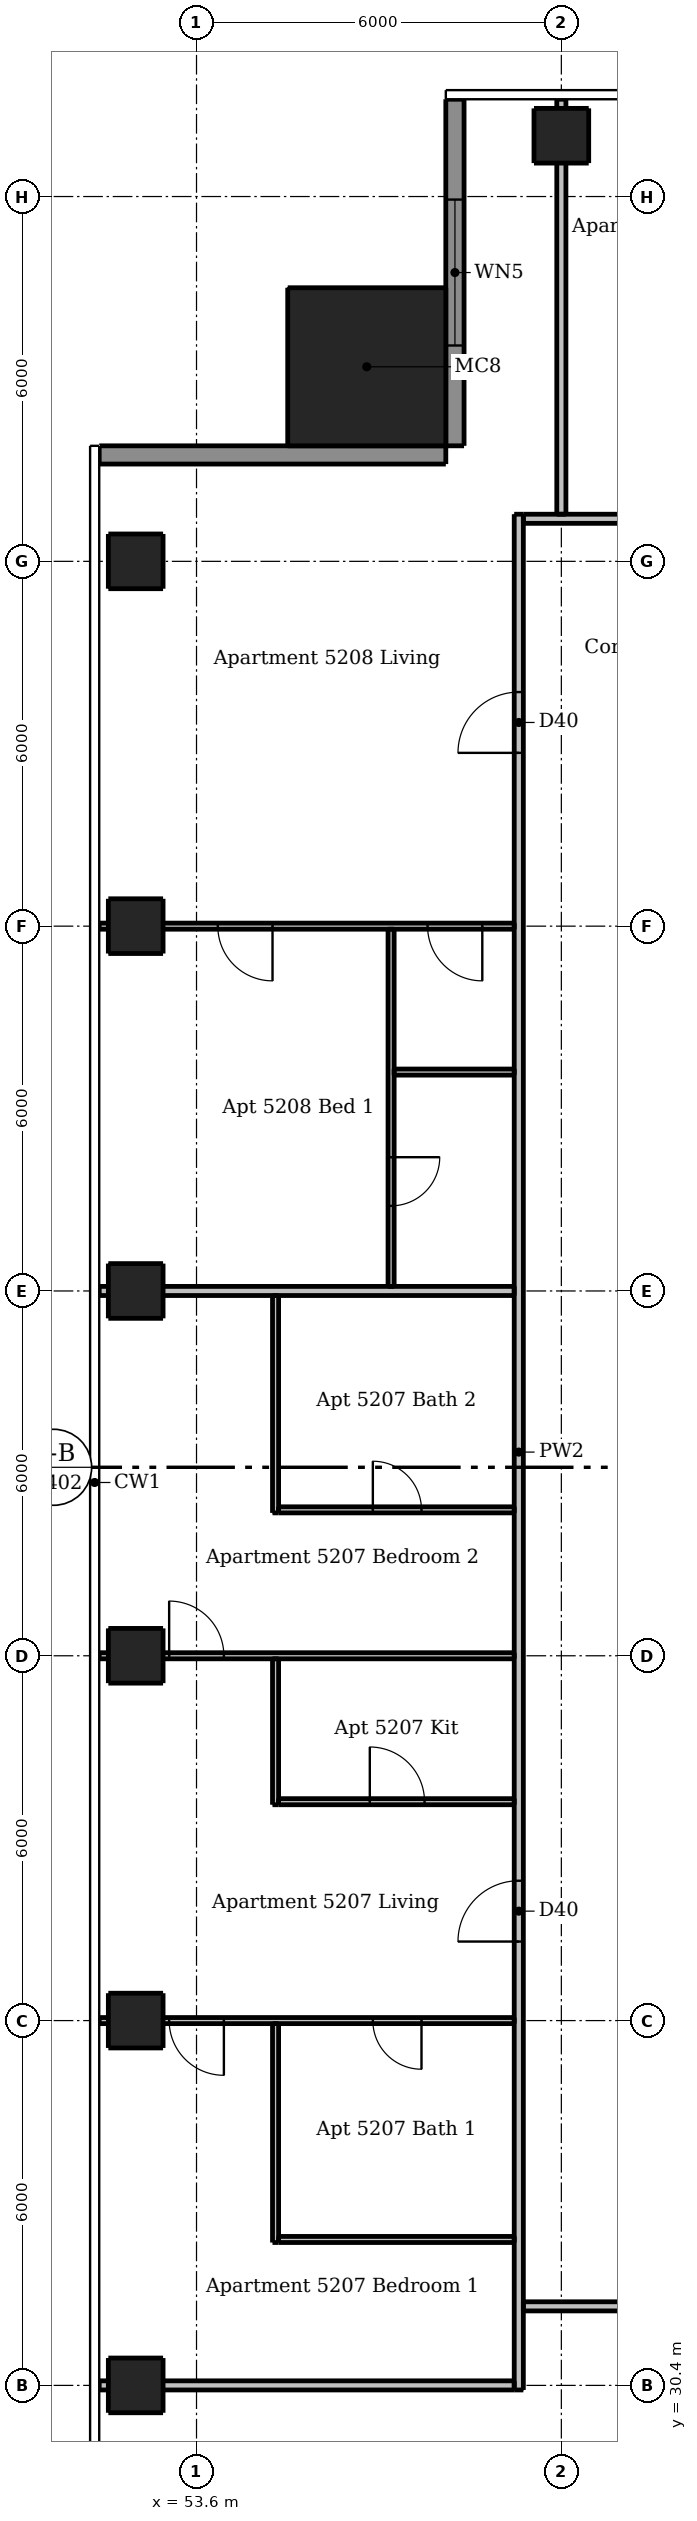
"""IFC4 building model, lengths in metres.
Left out: names, types, materials, properties, quantities, classifications, styles, units other than length and angle.
Written with IfcOpenShell. Run it as: python <this file> out.ifc"""

import sys

from ifc_helpers import new_model, si_unit, direction, frame, frame_2d, origin, origin_2d, place, context, subcontext, project, spatial, rectangle, extrude, element, fill, save


model = new_model("IFC4")
c1 = context("Model", 3, precision=1e-05, world=origin(), true_north=direction((0.0, 1.0)))
c2 = subcontext(c1, "Body", "Model", "MODEL_VIEW")
j1 = project(units=[si_unit("LENGTHUNIT", "METRE"), si_unit("PLANEANGLEUNIT", "RADIAN")], contexts=[c1])
p1 = place(None, origin())
s1 = spatial("IfcSite", under=j1, at=p1, CompositionType="ELEMENT")
p2 = place(p1, origin())
s2 = spatial("IfcBuilding", under=s1, at=p2, CompositionType="ELEMENT")
p3 = place(p2, frame((0.0, 0.0, 196.9)))
s3 = spatial("IfcBuildingStorey", under=s2, at=p3, CompositionType="ELEMENT", Elevation=196.9)
for number, where, z_axis, x_axis in (
    (1, (59.6, 67.4, 0.0), (0.0, 0.0, 1.0), (1.0, 0.0, 0.0)),
    (2, (52.6, 30.4, 0.0), (0.0, 0.0, 1.0), (1.0, 0.0, 0.0)),
    (3, (52.6, 36.4, 0.0), (0.0, 0.0, 1.0), (1.0, 0.0, 0.0)),
    (4, (52.6, 42.4, 0.0), (0.0, 0.0, 1.0), (1.0, 0.0, 0.0)),
    (5, (52.6, 48.4, 0.0), (0.0, 0.0, 1.0), (1.0, 0.0, 0.0)),
    (6, (52.6, 54.4, 0.0), (0.0, 0.0, 1.0), (1.0, 0.0, 0.0)),
    (7, (52.6, 60.4, 0.0), (0.0, 0.0, 1.0), (1.0, 0.0, 0.0)),
):
    element("IfcColumn", number, at=place(p3, frame(where, z_axis=z_axis, x_axis=x_axis)), inside=s3, PredefinedType="COLUMN", context=c2, shape_type="SweptSolid", body=[
        extrude(rectangle(XDim=0.9, YDim=0.9, at=origin_2d()), origin(), (0.0, 0.0, 1.0), 3.05),
    ])
p4 = place(p3, frame((56.4, 63.6, 0.0), z_axis=(0.0, 0.0, 1.0), x_axis=(1.0, 0.0, 0.0)))
e8 = element("IfcColumn", 8, at=p4, inside=s3, PredefinedType="COLUMN", context=c2, shape_type="SweptSolid", body=[
    extrude(rectangle(XDim=2.6, YDim=2.6, at=origin_2d()), origin(), (0.0, 0.0, 1.0), 3.3),
])
p5 = place(p3, frame((57.85, 68.0, 0.0), z_axis=(0.0, 0.0, 1.0), x_axis=(0.0, -1.0, 0.0)))
e9 = element("IfcWall", 9, at=p5, inside=s3, PredefinedType="SOLIDWALL", context=c2, shape_type="SweptSolid", body=[
    extrude(rectangle(XDim=5.7, YDim=0.3, at=frame_2d((2.85, 0.0))), origin(), (0.0, 0.0, 1.0), 3.05),
])
p6 = place(p5, frame((1.65, 0.0, 0.15)))
e10 = element("IfcOpeningElement", 10, at=p6, cuts=e9, PredefinedType="OPENING", context=c2, shape_type="SweptSolid", body=[
    extrude(rectangle(XDim=2.4, YDim=2.1, at=frame_2d((1.2, 1.05))), frame((0.0, 0.16, 0.0), z_axis=(0.0, -1.0, 0.0), x_axis=(1.0, 0.0, 0.0)), (0.0, 0.0, 1.0), 0.32),
])
p7 = place(p3, frame((57.7, 62.15, 0.0), z_axis=(0.0, 0.0, 1.0), x_axis=(-1.0, 0.0, 0.0)))
e11 = element("IfcWall", 11, at=p7, inside=s3, PredefinedType="SOLIDWALL", context=c2, shape_type="SweptSolid", body=[
    extrude(rectangle(XDim=5.7, YDim=0.3, at=frame_2d((2.85, 0.0))), origin(), (0.0, 0.0, 1.0), 3.05),
])
p8 = place(p3, frame((54.9, 32.75, 0.0), z_axis=(0.0, 0.0, 1.0), x_axis=(0.0, 1.0, 0.0)))
e12 = element("IfcWall", 12, at=p8, inside=s3, PredefinedType="PARTITIONING", context=c2, shape_type="SweptSolid", body=[
    extrude(rectangle(XDim=3.6, YDim=0.1, at=frame_2d((1.8, 0.0))), origin(), (0.0, 0.0, 1.0), 3.05),
])
p9 = place(p3, frame((54.9, 39.95, 0.0), z_axis=(0.0, 0.0, 1.0), x_axis=(0.0, 1.0, 0.0)))
e13 = element("IfcWall", 13, at=p9, inside=s3, PredefinedType="PARTITIONING", context=c2, shape_type="SweptSolid", body=[
    extrude(rectangle(XDim=2.4, YDim=0.1, at=frame_2d((1.2, 0.0))), origin(), (0.0, 0.0, 1.0), 3.05),
])
p10 = place(p3, frame((54.9, 44.75, 0.0), z_axis=(0.0, 0.0, 1.0), x_axis=(0.0, 1.0, 0.0)))
e14 = element("IfcWall", 14, at=p10, inside=s3, PredefinedType="PARTITIONING", context=c2, shape_type="SweptSolid", body=[
    extrude(rectangle(XDim=3.575, YDim=0.1, at=frame_2d((1.788, 0.0))), origin(), (0.0, 0.0, 1.0), 3.05),
])
p11 = place(p3, frame((56.8, 54.35, 0.0), z_axis=(0.0, 0.0, 1.0), x_axis=(0.0, -1.0, 0.0)))
e15 = element("IfcWall", 15, at=p11, inside=s3, PredefinedType="PARTITIONING", context=c2, shape_type="SweptSolid", body=[
    extrude(rectangle(XDim=5.875, YDim=0.1, at=frame_2d((2.938, 0.0))), origin(), (0.0, 0.0, 1.0), 3.05),
])
p12 = place(p11, frame((3.75, 0.0, 0.0)))
e16 = element("IfcOpeningElement", 16, at=p12, cuts=e15, PredefinedType="OPENING", context=c2, shape_type="SweptSolid", body=[
    extrude(rectangle(XDim=0.8, YDim=2.1, at=frame_2d((0.4, 1.05))), frame((0.0, 0.06, 0.0), z_axis=(0.0, -1.0, 0.0), x_axis=(1.0, 0.0, 0.0)), (0.0, 0.0, 1.0), 0.12),
])
p13 = place(p3, frame((58.825, 54.4, 0.0), z_axis=(0.0, 0.0, 1.0), x_axis=(-1.0, 0.0, 0.0)))
e17 = element("IfcWall", 17, at=p13, inside=s3, PredefinedType="PARTITIONING", context=c2, shape_type="SweptSolid", body=[
    extrude(rectangle(XDim=6.825, YDim=0.1, at=frame_2d((3.413, 0.0))), origin(), (0.0, 0.0, 1.0), 2.516),
])
p14 = place(p13, frame((0.525, 0.0, 0.0)))
e18 = element("IfcOpeningElement", 18, at=p14, cuts=e17, PredefinedType="OPENING", context=c2, shape_type="SweptSolid", body=[
    extrude(rectangle(XDim=0.9, YDim=2.1, at=frame_2d((0.45, 1.05))), frame((0.0, 0.06, 0.0), z_axis=(0.0, -1.0, 0.0), x_axis=(1.0, 0.0, 0.0)), (0.0, 0.0, 1.0), 0.12),
])
p15 = place(p13, frame((3.975, 0.0, 0.0)))
e19 = element("IfcOpeningElement", 19, at=p15, cuts=e17, PredefinedType="OPENING", context=c2, shape_type="SweptSolid", body=[
    extrude(rectangle(XDim=0.9, YDim=2.1, at=frame_2d((0.45, 1.05))), frame((0.0, 0.06, 0.0), z_axis=(0.0, -1.0, 0.0), x_axis=(1.0, 0.0, 0.0)), (0.0, 0.0, 1.0), 0.12),
])
p16 = place(p3, frame((56.85, 52.0, 0.0), z_axis=(0.0, 0.0, 1.0), x_axis=(1.0, 0.0, 0.0)))
e20 = element("IfcWall", 20, at=p16, inside=s3, PredefinedType="PARTITIONING", context=c2, shape_type="SweptSolid", body=[
    extrude(rectangle(XDim=1.975, YDim=0.1, at=frame_2d((0.987, 0.0))), origin(), (0.0, 0.0, 1.0), 3.05),
])
p17 = place(p3, frame((54.95, 44.8, 0.0), z_axis=(0.0, 0.0, 1.0), x_axis=(1.0, 0.0, 0.0)))
e21 = element("IfcWall", 21, at=p17, inside=s3, PredefinedType="PARTITIONING", context=c2, shape_type="SweptSolid", body=[
    extrude(rectangle(XDim=3.875, YDim=0.1, at=frame_2d((1.938, 0.0))), origin(), (0.0, 0.0, 1.0), 3.05),
])
p18 = place(p17, frame((1.55, 0.0, 0.0)))
e22 = element("IfcOpeningElement", 22, at=p18, cuts=e21, PredefinedType="OPENING", context=c2, shape_type="SweptSolid", body=[
    extrude(rectangle(XDim=0.8, YDim=2.1, at=frame_2d((0.4, 1.05))), frame((0.0, 0.06, 0.0), z_axis=(0.0, -1.0, 0.0), x_axis=(1.0, 0.0, 0.0)), (0.0, 0.0, 1.0), 0.12),
])
p19 = place(p3, frame((52.0, 42.4, 0.0), z_axis=(0.0, 0.0, 1.0), x_axis=(1.0, 0.0, 0.0)))
e23 = element("IfcWall", 23, at=p19, inside=s3, PredefinedType="PARTITIONING", context=c2, shape_type="SweptSolid", body=[
    extrude(rectangle(XDim=6.825, YDim=0.1, at=frame_2d((3.413, 0.0))), origin(), (0.0, 0.0, 1.0), 2.516),
])
p20 = place(p19, frame((1.15, 0.0, 0.0)))
e24 = element("IfcOpeningElement", 24, at=p20, cuts=e23, PredefinedType="OPENING", context=c2, shape_type="SweptSolid", body=[
    extrude(rectangle(XDim=0.9, YDim=2.1, at=frame_2d((0.45, 1.05))), frame((0.0, 0.06, 0.0), z_axis=(0.0, -1.0, 0.0), x_axis=(1.0, 0.0, 0.0)), (0.0, 0.0, 1.0), 0.12),
])
p21 = place(p3, frame((54.95, 40.0, 0.0), z_axis=(0.0, 0.0, 1.0), x_axis=(1.0, 0.0, 0.0)))
e25 = element("IfcWall", 25, at=p21, inside=s3, PredefinedType="PARTITIONING", context=c2, shape_type="SweptSolid", body=[
    extrude(rectangle(XDim=3.875, YDim=0.1, at=frame_2d((1.938, 0.0))), origin(), (0.0, 0.0, 1.0), 3.05),
])
p22 = place(p21, frame((1.5, 0.0, 0.0)))
e26 = element("IfcOpeningElement", 26, at=p22, cuts=e25, PredefinedType="OPENING", context=c2, shape_type="SweptSolid", body=[
    extrude(rectangle(XDim=0.9, YDim=2.1, at=frame_2d((0.45, 1.05))), frame((0.0, 0.06, 0.0), z_axis=(0.0, -1.0, 0.0), x_axis=(1.0, 0.0, 0.0)), (0.0, 0.0, 1.0), 0.12),
])
p23 = place(p3, frame((58.825, 36.4, 0.0), z_axis=(0.0, 0.0, 1.0), x_axis=(-1.0, 0.0, 0.0)))
e27 = element("IfcWall", 27, at=p23, inside=s3, PredefinedType="PARTITIONING", context=c2, shape_type="SweptSolid", body=[
    extrude(rectangle(XDim=6.825, YDim=0.1, at=frame_2d((3.413, 0.0))), origin(), (0.0, 0.0, 1.0), 2.516),
])
p24 = place(p23, frame((4.775, 0.0, 0.0)))
e28 = element("IfcOpeningElement", 28, at=p24, cuts=e27, PredefinedType="OPENING", context=c2, shape_type="SweptSolid", body=[
    extrude(rectangle(XDim=0.9, YDim=2.1, at=frame_2d((0.45, 1.05))), frame((0.0, 0.06, 0.0), z_axis=(0.0, -1.0, 0.0), x_axis=(1.0, 0.0, 0.0)), (0.0, 0.0, 1.0), 0.12),
])
p25 = place(p23, frame((1.525, 0.0, 0.0)))
e29 = element("IfcOpeningElement", 29, at=p25, cuts=e27, PredefinedType="OPENING", context=c2, shape_type="SweptSolid", body=[
    extrude(rectangle(XDim=0.8, YDim=2.1, at=frame_2d((0.4, 1.05))), frame((0.0, 0.06, 0.0), z_axis=(0.0, -1.0, 0.0), x_axis=(1.0, 0.0, 0.0)), (0.0, 0.0, 1.0), 0.12),
])
p26 = place(p3, frame((54.95, 32.8, 0.0), z_axis=(0.0, 0.0, 1.0), x_axis=(1.0, 0.0, 0.0)))
e30 = element("IfcWall", 30, at=p26, inside=s3, PredefinedType="PARTITIONING", context=c2, shape_type="SweptSolid", body=[
    extrude(rectangle(XDim=3.875, YDim=0.1, at=frame_2d((1.938, 0.0))), origin(), (0.0, 0.0, 1.0), 3.05),
])
p27 = place(p3, frame((58.9, 30.325, 0.0), z_axis=(0.0, 0.0, 1.0), x_axis=(0.0, 1.0, 0.0)))
e31 = element("IfcWall", 31, at=p27, inside=s3, PredefinedType="PARTITIONING", context=c2, shape_type="SweptSolid", body=[
    extrude(rectangle(XDim=30.85, YDim=0.15, at=frame_2d((15.425, 0.0))), origin(), (0.0, 0.0, 1.0), 3.05),
])
p28 = place(p27, frame((7.375, 0.0, 0.0)))
e32 = element("IfcOpeningElement", 32, at=p28, cuts=e31, PredefinedType="OPENING", context=c2, shape_type="SweptSolid", body=[
    extrude(rectangle(XDim=1.0, YDim=2.1, at=frame_2d((0.5, 1.05))), frame((0.0, 0.085, 0.0), z_axis=(0.0, -1.0, 0.0), x_axis=(1.0, 0.0, 0.0)), (0.0, 0.0, 1.0), 0.17),
])
p29 = place(p27, frame((26.925, 0.0, 0.0)))
e33 = element("IfcOpeningElement", 33, at=p29, cuts=e31, PredefinedType="OPENING", context=c2, shape_type="SweptSolid", body=[
    extrude(rectangle(XDim=1.0, YDim=2.1, at=frame_2d((0.5, 1.05))), frame((0.0, 0.085, 0.0), z_axis=(0.0, -1.0, 0.0), x_axis=(1.0, 0.0, 0.0)), (0.0, 0.0, 1.0), 0.17),
])
p30 = place(p3, frame((59.6, 61.175, 0.0), z_axis=(0.0, 0.0, 1.0), x_axis=(0.0, 1.0, 0.0)))
e34 = element("IfcWall", 34, at=p30, inside=s3, PredefinedType="PARTITIONING", context=c2, shape_type="SweptSolid", body=[
    extrude(rectangle(XDim=6.825, YDim=0.15, at=frame_2d((3.413, 0.0))), origin(), (0.0, 0.0, 1.0), 2.51),
])
p31 = place(p3, frame((58.975, 61.1, 0.0), z_axis=(0.0, 0.0, 1.0), x_axis=(1.0, 0.0, 0.0)))
e35 = element("IfcWall", 35, at=p31, inside=s3, PredefinedType="PARTITIONING", context=c2, shape_type="SweptSolid", body=[
    extrude(rectangle(XDim=29.25, YDim=0.15, at=frame_2d((14.625, 0.0))), origin(), (0.0, 0.0, 1.0), 3.05),
])
p32 = place(p31, frame((7.925, 0.0, 0.0)))
e36 = element("IfcOpeningElement", 36, at=p32, cuts=e35, PredefinedType="OPENING", context=c2, shape_type="SweptSolid", body=[
    extrude(rectangle(XDim=1.0, YDim=2.1, at=frame_2d((0.5, 1.05))), frame((0.0, 0.085, 0.0), z_axis=(0.0, -1.0, 0.0), x_axis=(1.0, 0.0, 0.0)), (0.0, 0.0, 1.0), 0.17),
])
p33 = place(p31, frame((26.475, 0.0, 0.0)))
e37 = element("IfcOpeningElement", 37, at=p33, cuts=e35, PredefinedType="OPENING", context=c2, shape_type="SweptSolid", body=[
    extrude(rectangle(XDim=1.0, YDim=2.1, at=frame_2d((0.5, 1.05))), frame((0.0, 0.085, 0.0), z_axis=(0.0, -1.0, 0.0), x_axis=(1.0, 0.0, 0.0)), (0.0, 0.0, 1.0), 0.17),
])
p34 = place(p3, frame((52.0, 48.4, 0.0), z_axis=(0.0, 0.0, 1.0), x_axis=(1.0, 0.0, 0.0)))
e38 = element("IfcWall", 38, at=p34, inside=s3, PredefinedType="PARTITIONING", context=c2, shape_type="SweptSolid", body=[
    extrude(rectangle(XDim=6.825, YDim=0.15, at=frame_2d((3.413, 0.0))), origin(), (0.0, 0.0, 1.0), 2.516),
])
p35 = place(p3, frame((89.525, 31.7, 0.0), z_axis=(0.0, 0.0, 1.0), x_axis=(-1.0, 0.0, 0.0)))
e39 = element("IfcWall", 39, at=p35, inside=s3, PredefinedType="PARTITIONING", context=c2, shape_type="SweptSolid", body=[
    extrude(rectangle(XDim=30.55, YDim=0.15, at=frame_2d((15.275, 0.0))), origin(), (0.0, 0.0, 1.0), 3.05),
])
p36 = place(p35, frame((26.775, 0.0, 0.0)))
e40 = element("IfcOpeningElement", 40, at=p36, cuts=e39, PredefinedType="OPENING", context=c2, shape_type="SweptSolid", body=[
    extrude(rectangle(XDim=1.0, YDim=2.1, at=frame_2d((0.5, 1.05))), frame((0.0, 0.085, 0.0), z_axis=(0.0, -1.0, 0.0), x_axis=(1.0, 0.0, 0.0)), (0.0, 0.0, 1.0), 0.17),
])
p37 = place(p35, frame((9.075, 0.0, 0.0)))
e41 = element("IfcOpeningElement", 41, at=p37, cuts=e39, PredefinedType="OPENING", context=c2, shape_type="SweptSolid", body=[
    extrude(rectangle(XDim=1.0, YDim=2.1, at=frame_2d((0.5, 1.05))), frame((0.0, 0.085, 0.0), z_axis=(0.0, -1.0, 0.0), x_axis=(1.0, 0.0, 0.0)), (0.0, 0.0, 1.0), 0.17),
])
p38 = place(p3, frame((52.0, 30.4, 0.0), z_axis=(0.0, 0.0, 1.0), x_axis=(1.0, 0.0, 0.0)))
e42 = element("IfcWall", 42, at=p38, inside=s3, PredefinedType="PARTITIONING", context=c2, shape_type="SweptSolid", body=[
    extrude(rectangle(XDim=6.825, YDim=0.15, at=frame_2d((3.413, 0.0))), origin(), (0.0, 0.0, 1.0), 2.647),
])
p39 = place(p6, origin())
e43 = element("IfcWindow", 43, at=p39, inside=s3, PartitioningType="DOUBLE_PANEL_VERTICAL", PredefinedType="WINDOW", context=c2, shape_type="SweptSolid", body=[
    extrude(rectangle(XDim=2.4, YDim=2.1, at=frame_2d((1.2, 1.05))), frame((0.0, 0.03, 0.0), z_axis=(0.0, -1.0, 0.0), x_axis=(1.0, 0.0, 0.0)), (0.0, 0.0, 1.0), 0.06),
])
fill(e10, e43)
p40 = place(p28, origin())
e44 = element("IfcDoor", 44, at=p40, inside=s3, OperationType="SINGLE_SWING_LEFT", PredefinedType="DOOR", context=c2, shape_type="SweptSolid", body=[
    extrude(rectangle(XDim=1.0, YDim=2.1, at=frame_2d((0.5, 1.05))), frame((0.0, 0.025, 0.0), z_axis=(0.0, -1.0, 0.0), x_axis=(1.0, 0.0, 0.0)), (0.0, 0.0, 1.0), 0.05),
])
fill(e32, e44)
p41 = place(p22, origin())
e45 = element("IfcDoor", 45, at=p41, inside=s3, OperationType="SINGLE_SWING_LEFT", PredefinedType="DOOR", context=c2, shape_type="SweptSolid", body=[
    extrude(rectangle(XDim=0.9, YDim=2.1, at=frame_2d((0.45, 1.05))), frame((0.0, 0.025, 0.0), z_axis=(0.0, -1.0, 0.0), x_axis=(1.0, 0.0, 0.0)), (0.0, 0.0, 1.0), 0.05),
])
fill(e26, e45)
p42 = place(p24, origin())
e46 = element("IfcDoor", 46, at=p42, inside=s3, OperationType="SINGLE_SWING_LEFT", PredefinedType="DOOR", context=c2, shape_type="SweptSolid", body=[
    extrude(rectangle(XDim=0.9, YDim=2.1, at=frame_2d((0.45, 1.05))), frame((0.0, 0.025, 0.0), z_axis=(0.0, -1.0, 0.0), x_axis=(1.0, 0.0, 0.0)), (0.0, 0.0, 1.0), 0.05),
])
fill(e28, e46)
p43 = place(p25, origin())
e47 = element("IfcDoor", 47, at=p43, inside=s3, OperationType="SINGLE_SWING_LEFT", PredefinedType="DOOR", context=c2, shape_type="SweptSolid", body=[
    extrude(rectangle(XDim=0.8, YDim=2.1, at=frame_2d((0.4, 1.05))), frame((0.0, 0.025, 0.0), z_axis=(0.0, -1.0, 0.0), x_axis=(1.0, 0.0, 0.0)), (0.0, 0.0, 1.0), 0.05),
])
fill(e29, e47)
p44 = place(p20, origin())
e48 = element("IfcDoor", 48, at=p44, inside=s3, OperationType="SINGLE_SWING_LEFT", PredefinedType="DOOR", context=c2, shape_type="SweptSolid", body=[
    extrude(rectangle(XDim=0.9, YDim=2.1, at=frame_2d((0.45, 1.05))), frame((0.0, 0.025, 0.0), z_axis=(0.0, -1.0, 0.0), x_axis=(1.0, 0.0, 0.0)), (0.0, 0.0, 1.0), 0.05),
])
fill(e24, e48)
p45 = place(p18, origin())
e49 = element("IfcDoor", 49, at=p45, inside=s3, OperationType="SINGLE_SWING_LEFT", PredefinedType="DOOR", context=c2, shape_type="SweptSolid", body=[
    extrude(rectangle(XDim=0.8, YDim=2.1, at=frame_2d((0.4, 1.05))), frame((0.0, 0.025, 0.0), z_axis=(0.0, -1.0, 0.0), x_axis=(1.0, 0.0, 0.0)), (0.0, 0.0, 1.0), 0.05),
])
fill(e22, e49)
p46 = place(p29, origin())
e50 = element("IfcDoor", 50, at=p46, inside=s3, OperationType="SINGLE_SWING_LEFT", PredefinedType="DOOR", context=c2, shape_type="SweptSolid", body=[
    extrude(rectangle(XDim=1.0, YDim=2.1, at=frame_2d((0.5, 1.05))), frame((0.0, 0.025, 0.0), z_axis=(0.0, -1.0, 0.0), x_axis=(1.0, 0.0, 0.0)), (0.0, 0.0, 1.0), 0.05),
])
fill(e33, e50)
p47 = place(p14, origin())
e51 = element("IfcDoor", 51, at=p47, inside=s3, OperationType="SINGLE_SWING_LEFT", PredefinedType="DOOR", context=c2, shape_type="SweptSolid", body=[
    extrude(rectangle(XDim=0.9, YDim=2.1, at=frame_2d((0.45, 1.05))), frame((0.0, 0.025, 0.0), z_axis=(0.0, -1.0, 0.0), x_axis=(1.0, 0.0, 0.0)), (0.0, 0.0, 1.0), 0.05),
])
fill(e18, e51)
p48 = place(p15, origin())
e52 = element("IfcDoor", 52, at=p48, inside=s3, OperationType="SINGLE_SWING_LEFT", PredefinedType="DOOR", context=c2, shape_type="SweptSolid", body=[
    extrude(rectangle(XDim=0.9, YDim=2.1, at=frame_2d((0.45, 1.05))), frame((0.0, 0.025, 0.0), z_axis=(0.0, -1.0, 0.0), x_axis=(1.0, 0.0, 0.0)), (0.0, 0.0, 1.0), 0.05),
])
fill(e19, e52)
p49 = place(p12, origin())
e53 = element("IfcDoor", 53, at=p49, inside=s3, OperationType="SINGLE_SWING_LEFT", PredefinedType="DOOR", context=c2, shape_type="SweptSolid", body=[
    extrude(rectangle(XDim=0.8, YDim=2.1, at=frame_2d((0.4, 1.05))), frame((0.0, 0.025, 0.0), z_axis=(0.0, -1.0, 0.0), x_axis=(1.0, 0.0, 0.0)), (0.0, 0.0, 1.0), 0.05),
])
fill(e16, e53)
save(model, sys.argv[1])
